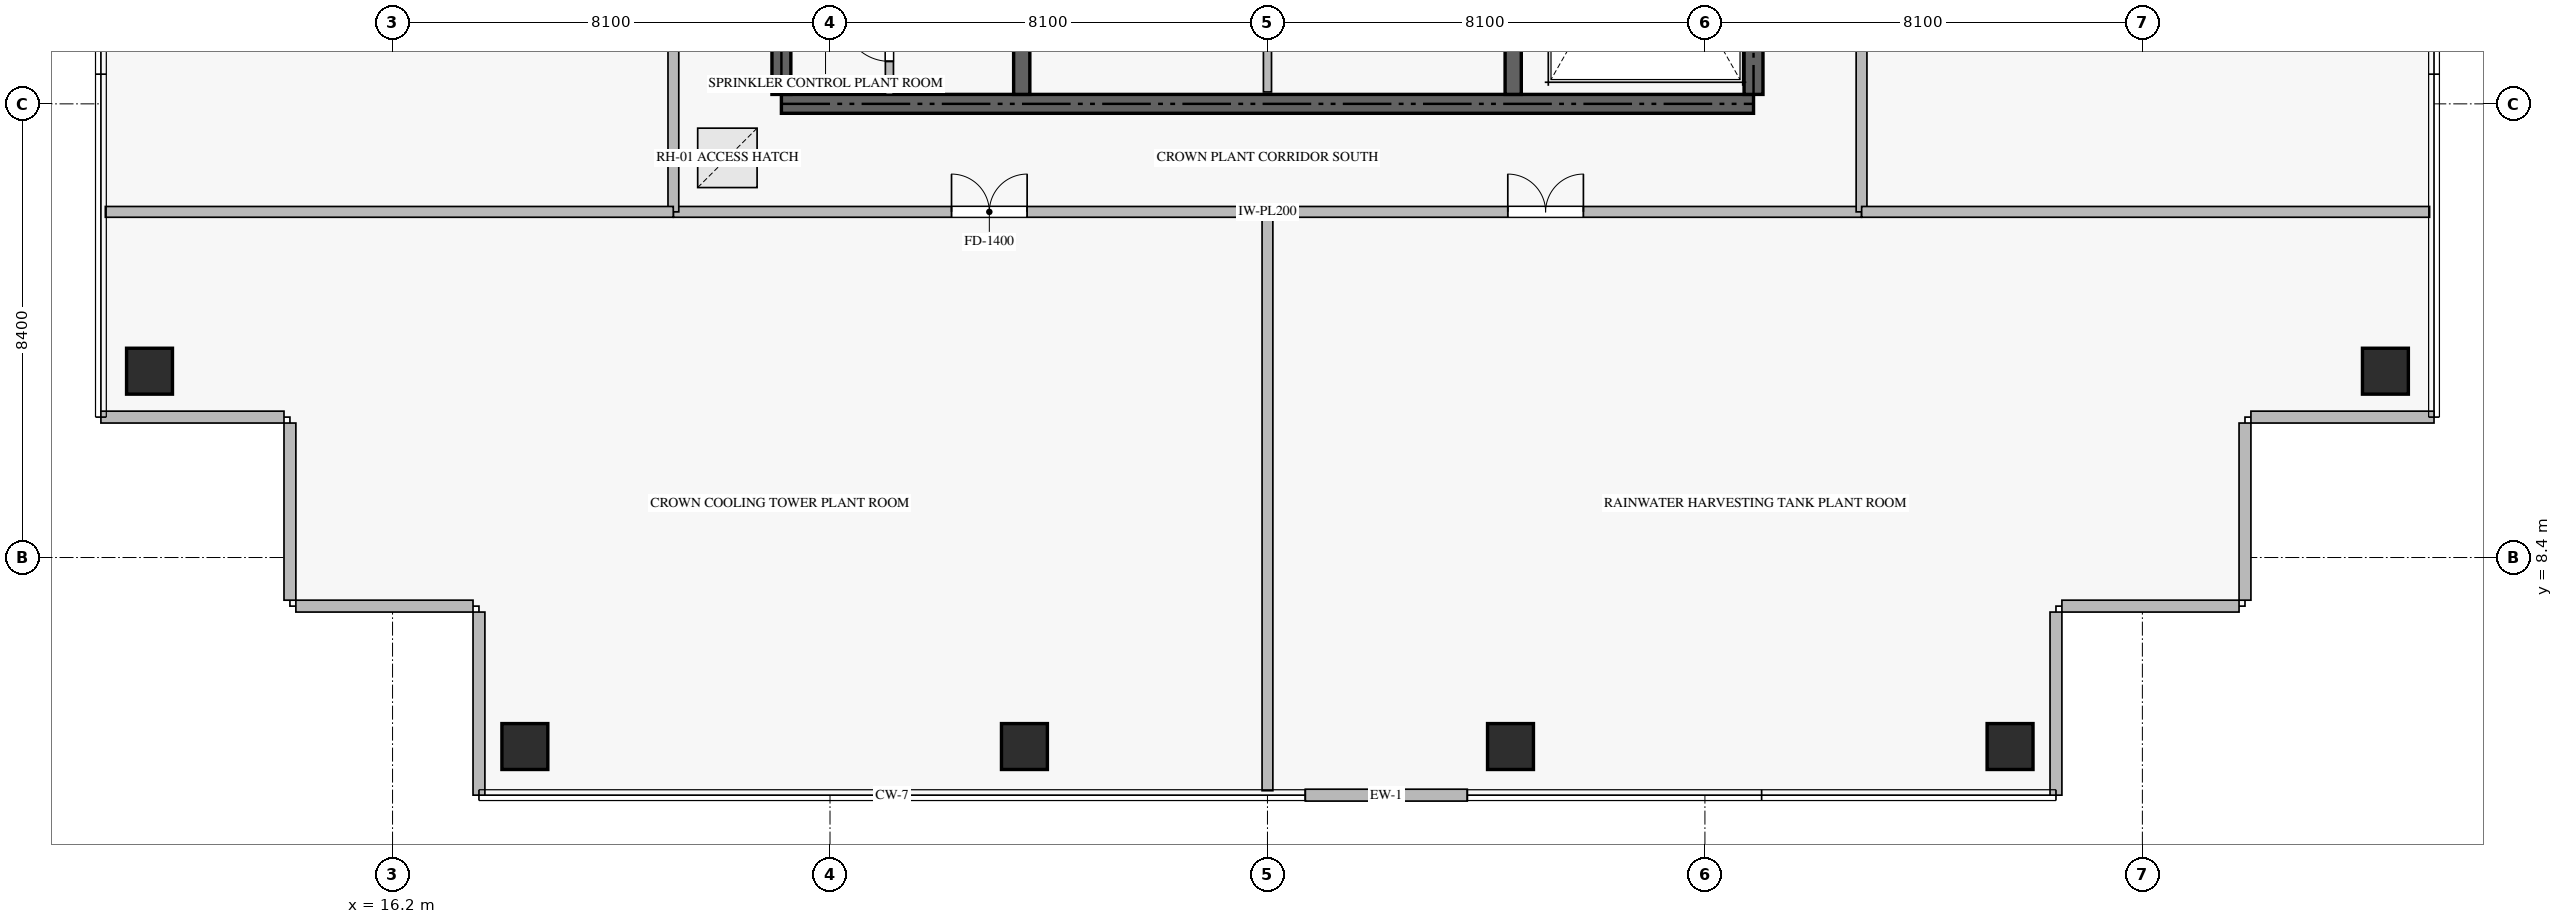
"""IFC4 building model, lengths in metres.
Left out: names, types, materials, properties, quantities, classifications, styles, units other than length and angle.
Written with IfcOpenShell. Run it as: python <this file> out.ifc"""

import sys

from ifc_helpers import new_model, si_unit, direction, frame, frame_2d, origin, origin_2d, place, context, subcontext, project, spatial, rectangle, extrude, source, transform, mapped, element, fill, save


model = new_model("IFC4")
c1 = context("Model", 3, precision=1e-05, world=origin(), true_north=direction((0.0, 1.0)))
c2 = subcontext(c1, "Body", "Model", "MODEL_VIEW")
j1 = project(units=[si_unit("LENGTHUNIT", "METRE"), si_unit("PLANEANGLEUNIT", "RADIAN")], contexts=[c1])
p1 = place(None, origin())
s1 = spatial("IfcSite", under=j1, at=p1, CompositionType="ELEMENT")
p2 = place(p1, origin())
s2 = spatial("IfcBuilding", under=s1, at=p2, CompositionType="ELEMENT")
p3 = place(p2, frame((0.0, 0.0, 365.75)))
s3 = spatial("IfcBuildingStorey", under=s2, at=p3, CompositionType="ELEMENT", Elevation=365.75)
p4 = place(p3, frame((23.4, 16.8, -0.36), z_axis=(0.0, 0.0, 1.0), x_axis=(1.0, 0.0, 0.0)))
e1 = element("IfcWall", 1, at=p4, inside=s3, PredefinedType="SHEAR", context=c2, shape_type="SweptSolid", body=[
    extrude(rectangle(XDim=18.0, YDim=0.35, at=frame_2d((9.0, 0.0))), origin(), (0.0, 0.0, 1.0), 5.258),
])
p5 = place(p3, frame((23.4, 16.975, -0.36), z_axis=(0.0, 0.0, 1.0), x_axis=(0.0, 1.0, 0.0)))
e2 = element("IfcWall", 2, at=p5, inside=s3, PredefinedType="SHEAR", context=c2, shape_type="SweptSolid", body=[
    extrude(rectangle(XDim=4.875, YDim=0.35, at=frame_2d((2.438, 0.0))), origin(), (0.0, 0.0, 1.0), 5.258),
])
p6 = place(p3, frame((41.4, 16.975, -0.36), z_axis=(0.0, 0.0, 1.0), x_axis=(0.0, 1.0, 0.0)))
e3 = element("IfcWall", 3, at=p6, inside=s3, PredefinedType="SHEAR", context=c2, shape_type="SweptSolid", body=[
    extrude(rectangle(XDim=8.375, YDim=0.35, at=frame_2d((4.188, 0.0))), origin(), (0.0, 0.0, 1.0), 5.258),
])
p7 = place(p3, frame((27.85, 16.975, -0.36), z_axis=(0.0, 0.0, 1.0), x_axis=(0.0, 1.0, 0.0)))
e4 = element("IfcWall", 4, at=p7, inside=s3, PredefinedType="SHEAR", context=c2, shape_type="SweptSolid", body=[
    extrude(rectangle(XDim=4.875, YDim=0.3, at=frame_2d((2.438, 0.0))), origin(), (0.0, 0.0, 1.0), 5.258),
])
p8 = place(p3, frame((36.95, 16.975, -0.36), z_axis=(0.0, 0.0, 1.0), x_axis=(0.0, 1.0, 0.0)))
e5 = element("IfcWall", 5, at=p8, inside=s3, PredefinedType="SHEAR", context=c2, shape_type="SweptSolid", body=[
    extrude(rectangle(XDim=8.375, YDim=0.3, at=frame_2d((4.188, 0.0))), origin(), (0.0, 0.0, 1.0), 5.258),
])
m1 = source(origin(), c2, "Body", "SweptSolid", [
    extrude(rectangle(XDim=0.85, YDim=0.85, at=origin_2d()), origin(), (0.0, 0.0, 1.0), 5.26),
])
for number, where, z_axis, x_axis in (
    (6, (18.65, 4.9, -0.36), (0.0, 0.0, 1.0), (1.0, 0.0, 0.0)),
    (7, (27.9, 4.9, -0.36), (0.0, 0.0, 1.0), (1.0, 0.0, 0.0)),
    (8, (36.9, 4.9, -0.36), (0.0, 0.0, 1.0), (1.0, 0.0, 0.0)),
    (9, (46.15, 4.9, -0.36), (0.0, 0.0, 1.0), (1.0, 0.0, 0.0)),
    (10, (53.1, 11.85, -0.36), (0.0, 0.0, 1.0), (1.0, 0.0, 0.0)),
    (11, (11.7, 11.85, -0.36), (0.0, 0.0, 1.0), (1.0, 0.0, 0.0)),
):
    element("IfcColumn", number, at=place(p3, frame(where, z_axis=z_axis, x_axis=x_axis)), inside=s3, PredefinedType="COLUMN", context=c2, shape_type="MappedRepresentation", body=[
        mapped(m1, transform((0.0, 0.0, 0.0), scale=1.0)),
    ])
p9 = place(p3, frame((33.1, 4.0, 0.0), z_axis=(0.0, 0.0, 1.0), x_axis=(1.0, 0.0, 0.0)))
e12 = element("IfcWall", 12, at=p9, inside=s3, PredefinedType="ELEMENTEDWALL", context=c2, shape_type="SweptSolid", body=[
    extrude(rectangle(XDim=3.0, YDim=0.22, at=frame_2d((1.5, 0.0))), origin(), (0.0, 0.0, 1.0), 4.885),
])
p10 = place(p3, frame((47.0, 4.0, 0.0), z_axis=(0.0, 0.0, 1.0), x_axis=(0.0, 1.0, 0.0)))
e13 = element("IfcWall", 13, at=p10, inside=s3, PredefinedType="ELEMENTEDWALL", context=c2, shape_type="SweptSolid", body=[
    extrude(rectangle(XDim=3.39, YDim=0.22, at=frame_2d((1.695, 0.0))), origin(), (0.0, 0.0, 1.0), 4.885),
])
for number, where, z_axis, x_axis in (
    (14, (47.11, 7.5, 0.0), (0.0, 0.0, 1.0), (1.0, 0.0, 0.0)),
    (15, (50.5, 7.61, 0.0), (0.0, 0.0, 1.0), (0.0, 1.0, 0.0)),
):
    element("IfcWall", number, at=place(p3, frame(where, z_axis=z_axis, x_axis=x_axis)), inside=s3, PredefinedType="ELEMENTEDWALL", context=c2, shape_type="SweptSolid", body=[
        extrude(rectangle(XDim=3.28, YDim=0.22, at=frame_2d((1.64, 0.0))), origin(), (0.0, 0.0, 1.0), 4.885),
    ])
for number, where, z_axis, x_axis in (
    (16, (50.61, 11.0, 0.0), (0.0, 0.0, 1.0), (1.0, 0.0, 0.0)),
    (17, (10.8, 11.0, 0.0), (0.0, 0.0, 1.0), (1.0, 0.0, 0.0)),
):
    element("IfcWall", number, at=place(p3, frame(where, z_axis=z_axis, x_axis=x_axis)), inside=s3, PredefinedType="ELEMENTEDWALL", context=c2, shape_type="SweptSolid", body=[
        extrude(rectangle(XDim=3.39, YDim=0.22, at=frame_2d((1.695, 0.0))), origin(), (0.0, 0.0, 1.0), 4.885),
    ])
p11 = place(p3, frame((14.3, 10.89, 0.0), z_axis=(0.0, 0.0, 1.0), x_axis=(0.0, -1.0, 0.0)))
e18 = element("IfcWall", 18, at=p11, inside=s3, PredefinedType="ELEMENTEDWALL", context=c2, shape_type="SweptSolid", body=[
    extrude(rectangle(XDim=3.28, YDim=0.22, at=frame_2d((1.64, 0.0))), origin(), (0.0, 0.0, 1.0), 4.885),
])
p12 = place(p3, frame((14.41, 7.5, 0.0), z_axis=(0.0, 0.0, 1.0), x_axis=(1.0, 0.0, 0.0)))
e19 = element("IfcWall", 19, at=p12, inside=s3, PredefinedType="ELEMENTEDWALL", context=c2, shape_type="SweptSolid", body=[
    extrude(rectangle(XDim=3.28, YDim=0.22, at=frame_2d((1.64, 0.0))), origin(), (0.0, 0.0, 1.0), 4.885),
])
p13 = place(p3, frame((17.8, 7.39, 0.0), z_axis=(0.0, 0.0, 1.0), x_axis=(0.0, -1.0, 0.0)))
e20 = element("IfcWall", 20, at=p13, inside=s3, PredefinedType="ELEMENTEDWALL", context=c2, shape_type="SweptSolid", body=[
    extrude(rectangle(XDim=3.39, YDim=0.22, at=frame_2d((1.695, 0.0))), origin(), (0.0, 0.0, 1.0), 4.885),
])
p14 = place(p3, frame((25.4, 16.975, 0.0), z_axis=(0.0, 0.0, 1.0), x_axis=(0.0, 1.0, 0.0)))
e21 = element("IfcWall", 21, at=p14, inside=s3, PredefinedType="PARTITIONING", context=c2, shape_type="SweptSolid", body=[
    extrude(rectangle(XDim=2.075, YDim=0.15, at=frame_2d((1.038, 0.0))), origin(), (0.0, 0.0, 1.0), 4.9),
])
p15 = place(p14, frame((0.612, 0.0, 0.0)))
e22 = element("IfcOpeningElement", 22, at=p15, cuts=e21, PredefinedType="OPENING", context=c2, shape_type="SweptSolid", body=[
    extrude(rectangle(XDim=0.85, YDim=2.1, at=frame_2d((0.425, 1.05))), frame((0.0, 0.085, 0.0), z_axis=(0.0, -1.0, 0.0), x_axis=(1.0, 0.0, 0.0)), (0.0, 0.0, 1.0), 0.17),
])
p16 = place(p3, frame((32.4, 17.02, 0.0), z_axis=(0.0, 0.0, 1.0), x_axis=(0.0, 1.0, 0.0)))
e23 = element("IfcWall", 23, at=p16, inside=s3, PredefinedType="PARTITIONING", context=c2, shape_type="SweptSolid", body=[
    extrude(rectangle(XDim=2.73, YDim=0.15, at=frame_2d((1.365, 0.0))), origin(), (0.0, 0.0, 1.0), 4.9),
])
p17 = place(p3, frame((21.4, 14.8, 0.0), z_axis=(0.0, 0.0, 1.0), x_axis=(1.0, 0.0, 0.0)))
e24 = element("IfcWall", 24, at=p17, inside=s3, PredefinedType="STANDARD", context=c2, shape_type="SweptSolid", body=[
    extrude(rectangle(XDim=22.0, YDim=0.2, at=frame_2d((11.0, 0.0))), origin(), (0.0, 0.0, 1.0), 4.9),
])
p18 = place(p17, frame((5.15, 0.0, 0.0)))
e25 = element("IfcOpeningElement", 25, at=p18, cuts=e24, PredefinedType="OPENING", context=c2, shape_type="SweptSolid", body=[
    extrude(rectangle(XDim=1.4, YDim=2.2, at=frame_2d((0.7, 1.1))), frame((0.0, 0.11, 0.0), z_axis=(0.0, -1.0, 0.0), x_axis=(1.0, 0.0, 0.0)), (0.0, 0.0, 1.0), 0.22),
])
p19 = place(p17, frame((15.45, 0.0, 0.0)))
e26 = element("IfcOpeningElement", 26, at=p19, cuts=e24, PredefinedType="OPENING", context=c2, shape_type="SweptSolid", body=[
    extrude(rectangle(XDim=1.4, YDim=2.2, at=frame_2d((0.7, 1.1))), frame((0.0, 0.11, 0.0), z_axis=(0.0, -1.0, 0.0), x_axis=(1.0, 0.0, 0.0)), (0.0, 0.0, 1.0), 0.22),
])
p20 = place(p3, frame((21.4, 14.8, 0.0), z_axis=(0.0, 0.0, 1.0), x_axis=(0.0, 1.0, 0.0)))
e27 = element("IfcWall", 27, at=p20, inside=s3, PredefinedType="STANDARD", context=c2, shape_type="SweptSolid", body=[
    extrude(rectangle(XDim=20.8, YDim=0.2, at=frame_2d((10.4, 0.0))), origin(), (0.0, 0.0, 1.0), 4.9),
])
p21 = place(p20, frame((9.7, 0.0, 0.0)))
e28 = element("IfcOpeningElement", 28, at=p21, cuts=e27, PredefinedType="OPENING", context=c2, shape_type="SweptSolid", body=[
    extrude(rectangle(XDim=1.4, YDim=2.2, at=frame_2d((0.7, 1.1))), frame((0.0, 0.11, 0.0), z_axis=(0.0, -1.0, 0.0), x_axis=(1.0, 0.0, 0.0)), (0.0, 0.0, 1.0), 0.22),
])
p22 = place(p3, frame((43.4, 14.8, 0.0), z_axis=(0.0, 0.0, 1.0), x_axis=(0.0, 1.0, 0.0)))
e29 = element("IfcWall", 29, at=p22, inside=s3, PredefinedType="STANDARD", context=c2, shape_type="SweptSolid", body=[
    extrude(rectangle(XDim=20.8, YDim=0.2, at=frame_2d((10.4, 0.0))), origin(), (0.0, 0.0, 1.0), 4.9),
])
p23 = place(p22, frame((9.7, 0.0, 0.0)))
e30 = element("IfcOpeningElement", 30, at=p23, cuts=e29, PredefinedType="OPENING", context=c2, shape_type="SweptSolid", body=[
    extrude(rectangle(XDim=1.4, YDim=2.2, at=frame_2d((0.7, 1.1))), frame((0.0, 0.11, 0.0), z_axis=(0.0, -1.0, 0.0), x_axis=(1.0, 0.0, 0.0)), (0.0, 0.0, 1.0), 0.22),
])
for number, where, z_axis, x_axis in (
    (31, (10.882, 14.8, 0.0), (0.0, 0.0, 1.0), (1.0, 0.0, 0.0)),
    (32, (43.402, 14.8, 0.0), (0.0, 0.0, 1.0), (1.0, 0.0, 0.0)),
):
    element("IfcWall", number, at=place(p3, frame(where, z_axis=z_axis, x_axis=x_axis)), inside=s3, PredefinedType="STANDARD", context=c2, shape_type="SweptSolid", body=[
        extrude(rectangle(XDim=10.516, YDim=0.2, at=frame_2d((5.258, 0.0))), origin(), (0.0, 0.0, 1.0), 4.9),
    ])
p24 = place(p3, frame((32.4, 4.082, 0.0), z_axis=(0.0, 0.0, 1.0), x_axis=(0.0, 1.0, 0.0)))
e33 = element("IfcWall", 33, at=p24, inside=s3, PredefinedType="STANDARD", context=c2, shape_type="SweptSolid", body=[
    extrude(rectangle(XDim=10.718, YDim=0.2, at=frame_2d((5.359, 0.0))), origin(), (0.0, 0.0, 1.0), 4.9),
])
p25 = place(p2, frame((0.0, 0.0, 370.95)))
p26 = place(p25, frame((0.0, 0.0, -0.3)))
p27 = place(p26, frame((22.4, 15.8, 0.0)))
p28 = place(p27, frame((0.0, 0.0, 0.26)))
e34 = element("IfcDoor", 34, at=p28, inside=s3, OperationType="SINGLE_SWING_LEFT", PredefinedType="TRAPDOOR", context=c2, shape_type="SweptSolid", body=[
    extrude(rectangle(XDim=1.1, YDim=1.1, at=origin_2d()), origin(), (0.0, 0.0, 1.0), 0.04),
])
m2 = source(origin(), c2, "Body", "SweptSolid", [
    extrude(rectangle(XDim=0.85, YDim=2.1, at=frame_2d((0.425, 1.05))), frame((0.0, 0.025, 0.0), z_axis=(0.0, -1.0, 0.0), x_axis=(1.0, 0.0, 0.0)), (0.0, 0.0, 1.0), 0.05),
])
p29 = place(p15, origin())
e35 = element("IfcDoor", 35, at=p29, inside=s3, OperationType="SINGLE_SWING_RIGHT", PredefinedType="DOOR", context=c2, shape_type="MappedRepresentation", body=[
    mapped(m2, transform((0.0, 0.0, 0.0), scale=1.0)),
])
fill(e22, e35)
m3 = source(origin(), c2, "Body", "SweptSolid", [
    extrude(rectangle(XDim=1.4, YDim=2.2, at=frame_2d((0.7, 1.1))), frame((0.0, 0.025, 0.0), z_axis=(0.0, -1.0, 0.0), x_axis=(1.0, 0.0, 0.0)), (0.0, 0.0, 1.0), 0.05),
])
p30 = place(p18, origin())
e36 = element("IfcDoor", 36, at=p30, inside=s3, OperationType="DOUBLE_DOOR_SINGLE_SWING", PredefinedType="DOOR", context=c2, shape_type="MappedRepresentation", body=[
    mapped(m3, transform((0.0, 0.0, 0.0), scale=1.0)),
])
fill(e25, e36)
p31 = place(p19, origin())
e37 = element("IfcDoor", 37, at=p31, inside=s3, OperationType="DOUBLE_DOOR_SINGLE_SWING", PredefinedType="DOOR", context=c2, shape_type="MappedRepresentation", body=[
    mapped(m3, transform((0.0, 0.0, 0.0), scale=1.0)),
])
fill(e26, e37)
save(model, sys.argv[1])
